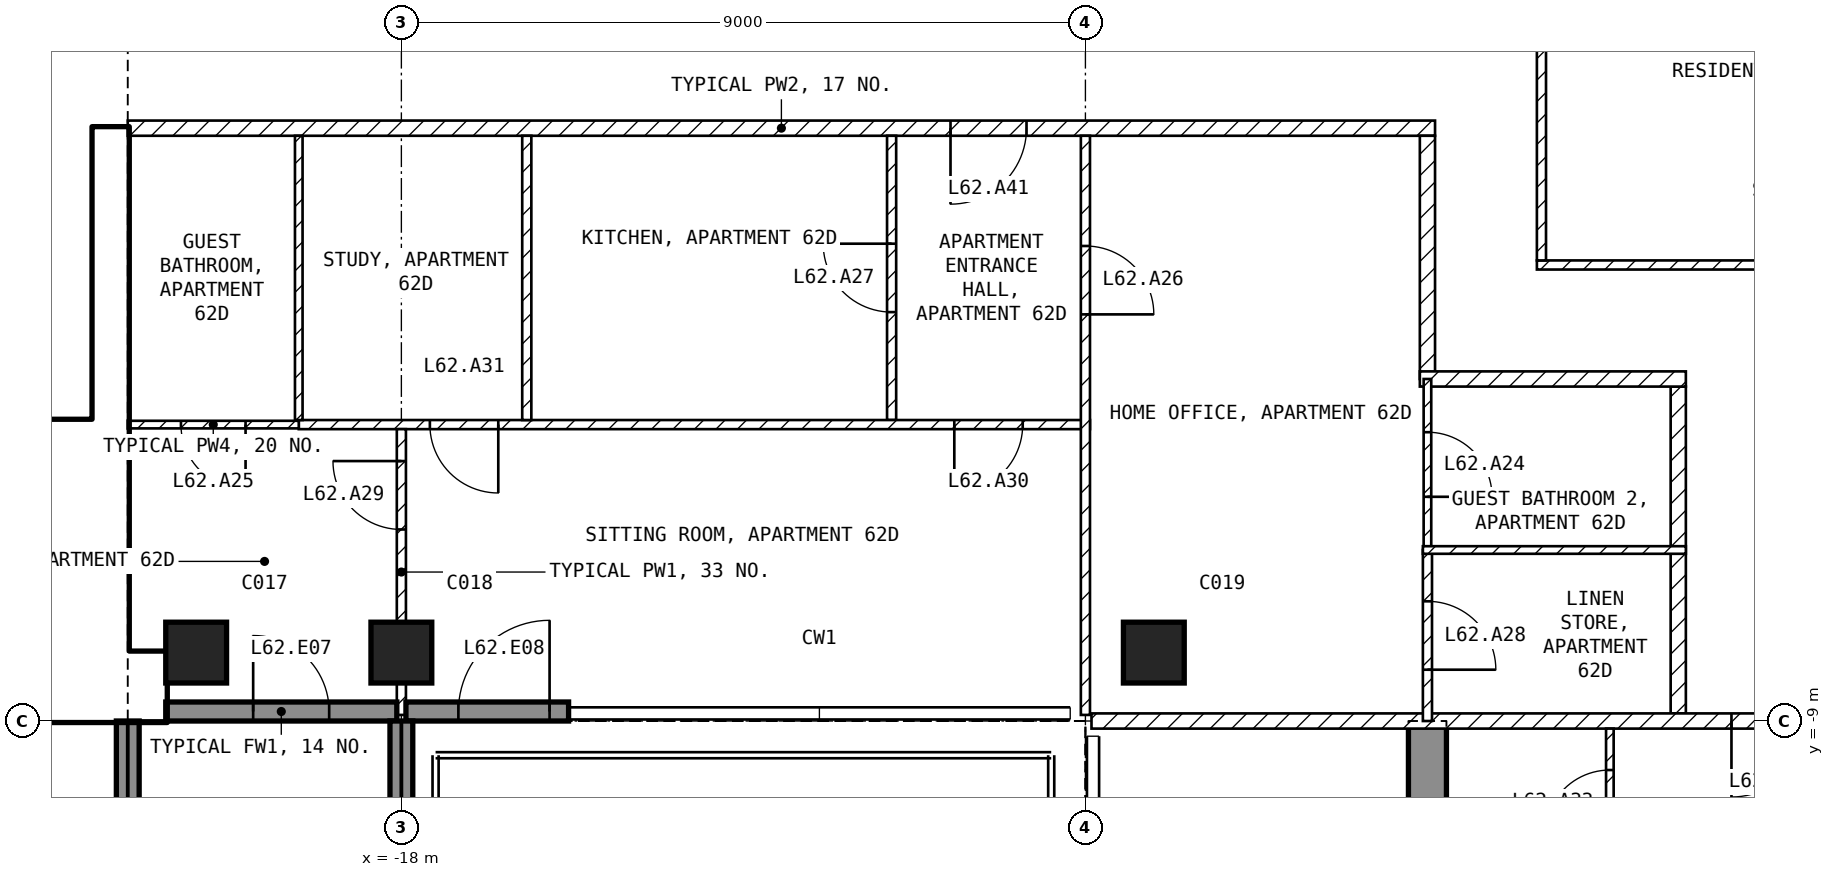
"""IFC4 building model, lengths in metres.
Left out: names, types, materials, properties, quantities, classifications, styles, units other than length and angle.
Written with IfcOpenShell. Run it as: python <this file> out.ifc"""

import sys

from ifc_helpers import new_model, si_unit, direction, frame, frame_2d, origin, origin_2d, place, context, subcontext, project, spatial, polyline, rectangle, outline, extrude, element, fill, save


model = new_model("IFC4")
c1 = context("Model", 3, precision=1e-05, world=origin(), true_north=direction((0.0, 1.0)))
c2 = subcontext(c1, "Body", "Model", "MODEL_VIEW")
j1 = project(units=[si_unit("LENGTHUNIT", "METRE"), si_unit("PLANEANGLEUNIT", "RADIAN")], contexts=[c1])
p1 = place(None, origin())
s1 = spatial("IfcSite", under=j1, at=p1, CompositionType="ELEMENT")
p2 = place(p1, origin())
s2 = spatial("IfcBuilding", under=s1, at=p2, CompositionType="ELEMENT")
p3 = place(p2, frame((0.0, 0.0, 246.5)))
s3 = spatial("IfcBuildingStorey", under=s2, at=p3, CompositionType="ELEMENT", Elevation=246.5)
for number, where, z_axis, x_axis in (
    (1, (-20.7, -8.1, -0.25), (0.0, 0.0, 1.0), (1.0, 0.0, 0.0)),
    (2, (-18.0, -8.1, -0.25), (0.0, 0.0, 1.0), (1.0, 0.0, 0.0)),
    (3, (-8.1, -8.1, -0.25), (0.0, 0.0, 1.0), (1.0, 0.0, 0.0)),
):
    element("IfcColumn", number, at=place(p3, frame(where, z_axis=z_axis, x_axis=x_axis)), inside=s3, PredefinedType="COLUMN", context=c2, shape_type="SweptSolid", body=[
        extrude(rectangle(XDim=0.8, YDim=0.8, at=origin_2d()), origin(), (0.0, 0.0, 1.0), 3.5),
    ])
p4 = place(p3, frame((-4.75, -16.7, -0.25), z_axis=(1.0, 0.0, 0.0), x_axis=(0.0, 1.0, 0.0)))
e4 = element("IfcWall", 4, at=p4, inside=s3, PredefinedType="SHEAR", context=c2, shape_type="SweptSolid", body=[
    extrude(outline(polyline([(0.0, 0.0), (3.2, 0.0), (3.2, 2.65), (5.6, 2.65), (5.6, 0.0), (7.7, 0.0), (7.7, 3.5), (0.0, 3.5), (0.0, 0.0)])), origin(), (0.0, 0.0, 1.0), 0.5),
])
p5 = place(p3, frame((-21.1, -8.875, 0.0), z_axis=(0.0, 0.0, 1.0), x_axis=(1.0, 0.0, 0.0)))
e5 = element("IfcWall", 5, at=p5, inside=s3, PredefinedType="SOLIDWALL", context=c2, shape_type="SweptSolid", body=[
    extrude(rectangle(XDim=3.04, YDim=0.25, at=frame_2d((1.52, 0.0))), origin(), (0.0, 0.0, 1.0), 3.25),
])
p6 = place(p5, frame((1.15, 0.0, 0.0)))
e6 = element("IfcOpeningElement", 6, at=p6, cuts=e5, PredefinedType="OPENING", context=c2, shape_type="SweptSolid", body=[
    extrude(rectangle(XDim=1.0, YDim=2.4, at=frame_2d((0.5, 1.2))), frame((0.0, 0.135, 0.0), z_axis=(0.0, -1.0, 0.0), x_axis=(1.0, 0.0, 0.0)), (0.0, 0.0, 1.0), 0.27),
])
p7 = place(p3, frame((-17.94, -8.875, 0.0), z_axis=(0.0, 0.0, 1.0), x_axis=(1.0, 0.0, 0.0)))
e7 = element("IfcWall", 7, at=p7, inside=s3, PredefinedType="SOLIDWALL", context=c2, shape_type="SweptSolid", body=[
    extrude(rectangle(XDim=2.14, YDim=0.25, at=frame_2d((1.07, 0.0))), origin(), (0.0, 0.0, 1.0), 3.25),
])
p8 = place(p7, frame((0.69, 0.0, 0.0)))
e8 = element("IfcOpeningElement", 8, at=p8, cuts=e7, PredefinedType="OPENING", context=c2, shape_type="SweptSolid", body=[
    extrude(rectangle(XDim=1.2, YDim=2.4, at=frame_2d((0.6, 1.2))), frame((0.0, 0.135, 0.0), z_axis=(0.0, -1.0, 0.0), x_axis=(1.0, 0.0, 0.0)), (0.0, 0.0, 1.0), 0.27),
])
p9 = place(p3, frame((-21.6, -9.0, 0.0), z_axis=(0.0, 0.0, 1.0), x_axis=(0.0, -1.0, 0.0)))
e9 = element("IfcWall", 9, at=p9, inside=s3, PredefinedType="SOLIDWALL", context=c2, shape_type="SweptSolid", body=[
    extrude(rectangle(XDim=2.7, YDim=0.3, at=frame_2d((1.35, 0.0))), origin(), (0.0, 0.0, 1.0), 3.25),
])
p10 = place(p3, frame((-18.0, -9.0, 0.0), z_axis=(0.0, 0.0, 1.0), x_axis=(0.0, -1.0, 0.0)))
e10 = element("IfcWall", 10, at=p10, inside=s3, PredefinedType="SOLIDWALL", context=c2, shape_type="SweptSolid", body=[
    extrude(rectangle(XDim=2.74, YDim=0.3, at=frame_2d((1.37, 0.0))), origin(), (0.0, 0.0, 1.0), 3.25),
])
p11 = place(p3, frame((-30.2, -8.55, 0.0), z_axis=(0.0, 0.0, 1.0), x_axis=(1.0, 0.0, 0.0)))
e11 = element("IfcWall", 11, at=p11, inside=s3, PredefinedType="SHEAR", context=c2, shape_type="SweptSolid", body=[
    extrude(rectangle(XDim=9.1, YDim=0.9, at=frame_2d((4.55, 0.0))), origin(), (0.0, 0.0, 1.0), 3.25),
])
p12 = place(p3, frame((-21.825, -8.1, 0.0), z_axis=(0.0, 0.0, 1.0), x_axis=(0.0, 1.0, 0.0)))
e12 = element("IfcWall", 12, at=p12, inside=s3, PredefinedType="SHEAR", context=c2, shape_type="SweptSolid", body=[
    extrude(rectangle(XDim=6.9, YDim=0.45, at=frame_2d((3.45, 0.0))), origin(), (0.0, 0.0, 1.0), 3.25),
])
p13 = place(p3, frame((-28.35, -5.15, 0.0), z_axis=(0.0, 0.0, 1.0), x_axis=(1.0, 0.0, 0.0)))
e13 = element("IfcWall", 13, at=p13, inside=s3, PredefinedType="SOLIDWALL", context=c2, shape_type="SweptSolid", body=[
    extrude(rectangle(XDim=6.3, YDim=0.2, at=frame_2d((3.15, 0.0))), origin(), (0.0, 0.0, 1.0), 3.25),
])
p14 = place(p13, frame((5.1, 0.0, 0.0)))
e14 = element("IfcOpeningElement", 14, at=p14, cuts=e13, PredefinedType="OPENING", context=c2, shape_type="SweptSolid", body=[
    extrude(rectangle(XDim=1.0, YDim=2.1, at=frame_2d((0.5, 1.05))), frame((0.0, 0.11, 0.0), z_axis=(0.0, -1.0, 0.0), x_axis=(1.0, 0.0, 0.0)), (0.0, 0.0, 1.0), 0.22),
])
p15 = place(p3, frame((-3.06, -3.0, 0.0), z_axis=(0.0, 0.0, 1.0), x_axis=(1.0, 0.0, 0.0)))
e15 = element("IfcWall", 15, at=p15, inside=s3, PredefinedType="PARTITIONING", context=c2, shape_type="SweptSolid", body=[
    extrude(rectangle(XDim=6.12, YDim=0.12, at=frame_2d((3.06, 0.0))), origin(), (0.0, 0.0, 1.0), 3.25),
])
p16 = place(p3, frame((-3.0, 2.94, 0.0), z_axis=(0.0, 0.0, 1.0), x_axis=(0.0, -1.0, 0.0)))
e16 = element("IfcWall", 16, at=p16, inside=s3, PredefinedType="PARTITIONING", context=c2, shape_type="SweptSolid", body=[
    extrude(rectangle(XDim=5.88, YDim=0.12, at=frame_2d((2.94, 0.0))), origin(), (0.0, 0.0, 1.0), 3.25),
])
p17 = place(p3, frame((-4.4, -1.2, 0.0), z_axis=(0.0, 0.0, 1.0), x_axis=(-1.0, 0.0, 0.0)))
e17 = element("IfcWall", 17, at=p17, inside=s3, PredefinedType="PARTITIONING", context=c2, shape_type="SweptSolid", body=[
    extrude(rectangle(XDim=17.2, YDim=0.2, at=frame_2d((8.6, 0.0))), origin(), (0.0, 0.0, 1.0), 3.25),
])
p18 = place(p17, frame((5.375, 0.0, 0.0)))
e18 = element("IfcOpeningElement", 18, at=p18, cuts=e17, PredefinedType="OPENING", context=c2, shape_type="SweptSolid", body=[
    extrude(rectangle(XDim=1.0, YDim=2.1, at=frame_2d((0.5, 1.05))), frame((0.0, 0.11, 0.0), z_axis=(0.0, -1.0, 0.0), x_axis=(1.0, 0.0, 0.0)), (0.0, 0.0, 1.0), 0.22),
])
p19 = place(p3, frame((-4.5, -4.5, 0.0), z_axis=(0.0, 0.0, 1.0), x_axis=(0.0, 1.0, 0.0)))
e19 = element("IfcWall", 19, at=p19, inside=s3, PredefinedType="PARTITIONING", context=c2, shape_type="SweptSolid", body=[
    extrude(rectangle(XDim=3.2, YDim=0.2, at=frame_2d((1.6, 0.0))), origin(), (0.0, 0.0, 1.0), 3.25),
])
p20 = place(p3, frame((-1.2, -8.9, 0.0), z_axis=(0.0, 0.0, 1.0), x_axis=(0.0, 1.0, 0.0)))
e20 = element("IfcWall", 20, at=p20, inside=s3, PredefinedType="PARTITIONING", context=c2, shape_type="SweptSolid", body=[
    extrude(rectangle(XDim=4.3, YDim=0.2, at=frame_2d((2.15, 0.0))), origin(), (0.0, 0.0, 1.0), 3.25),
])
p21 = place(p3, frame((-1.1, -4.5, 0.0), z_axis=(0.0, 0.0, 1.0), x_axis=(-1.0, 0.0, 0.0)))
e21 = element("IfcWall", 21, at=p21, inside=s3, PredefinedType="PARTITIONING", context=c2, shape_type="SweptSolid", body=[
    extrude(rectangle(XDim=3.5, YDim=0.2, at=frame_2d((1.75, 0.0))), origin(), (0.0, 0.0, 1.0), 3.25),
])
p22 = place(p3, frame((8.92, -9.0, 0.0), z_axis=(0.0, 0.0, 1.0), x_axis=(-1.0, 0.0, 0.0)))
e22 = element("IfcWall", 22, at=p22, inside=s3, PredefinedType="PARTITIONING", context=c2, shape_type="SweptSolid", body=[
    extrude(rectangle(XDim=17.84, YDim=0.2, at=frame_2d((8.92, 0.0))), origin(), (0.0, 0.0, 1.0), 3.25),
])
p23 = place(p22, frame((8.42, 0.0, 0.0)))
e23 = element("IfcOpeningElement", 23, at=p23, cuts=e22, PredefinedType="OPENING", context=c2, shape_type="SweptSolid", body=[
    extrude(rectangle(XDim=1.0, YDim=2.1, at=frame_2d((0.5, 1.05))), frame((0.0, 0.11, 0.0), z_axis=(0.0, -1.0, 0.0), x_axis=(1.0, 0.0, 0.0)), (0.0, 0.0, 1.0), 0.22),
])
p24 = place(p3, frame((-11.55, -5.04, 0.0), z_axis=(0.0, 0.0, 1.0), x_axis=(0.0, 1.0, 0.0)))
e24 = element("IfcWall", 24, at=p24, inside=s3, PredefinedType="PARTITIONING", context=c2, shape_type="SweptSolid", body=[
    extrude(rectangle(XDim=3.74, YDim=0.12, at=frame_2d((1.87, 0.0))), origin(), (0.0, 0.0, 1.0), 3.25),
])
p25 = place(p24, frame((1.42, 0.0, 0.0)))
e25 = element("IfcOpeningElement", 25, at=p25, cuts=e24, PredefinedType="OPENING", context=c2, shape_type="SweptSolid", body=[
    extrude(rectangle(XDim=0.9, YDim=2.1, at=frame_2d((0.45, 1.05))), frame((0.0, 0.07, 0.0), z_axis=(0.0, -1.0, 0.0), x_axis=(1.0, 0.0, 0.0)), (0.0, 0.0, 1.0), 0.14),
])
p26 = place(p3, frame((-8.94, -5.1, 0.0), z_axis=(0.0, 0.0, 1.0), x_axis=(-1.0, 0.0, 0.0)))
e26 = element("IfcWall", 26, at=p26, inside=s3, PredefinedType="PARTITIONING", context=c2, shape_type="SweptSolid", body=[
    extrude(rectangle(XDim=10.41, YDim=0.12, at=frame_2d((5.205, 0.0))), origin(), (0.0, 0.0, 1.0), 3.25),
])
p27 = place(p26, frame((0.885, 0.0, 0.0)))
e27 = element("IfcOpeningElement", 27, at=p27, cuts=e26, PredefinedType="OPENING", context=c2, shape_type="SweptSolid", body=[
    extrude(rectangle(XDim=0.9, YDim=2.1, at=frame_2d((0.45, 1.05))), frame((0.0, 0.07, 0.0), z_axis=(0.0, -1.0, 0.0), x_axis=(1.0, 0.0, 0.0)), (0.0, 0.0, 1.0), 0.14),
])
p28 = place(p26, frame((7.785, 0.0, 0.0)))
e28 = element("IfcOpeningElement", 28, at=p28, cuts=e26, PredefinedType="OPENING", context=c2, shape_type="SweptSolid", body=[
    extrude(rectangle(XDim=0.9, YDim=2.1, at=frame_2d((0.45, 1.05))), frame((0.0, 0.07, 0.0), z_axis=(0.0, -1.0, 0.0), x_axis=(1.0, 0.0, 0.0)), (0.0, 0.0, 1.0), 0.14),
])
p29 = place(p3, frame((-9.0, -1.3, 0.0), z_axis=(0.0, 0.0, 1.0), x_axis=(0.0, -1.0, 0.0)))
e29 = element("IfcWall", 29, at=p29, inside=s3, PredefinedType="PARTITIONING", context=c2, shape_type="SweptSolid", body=[
    extrude(rectangle(XDim=7.62, YDim=0.12, at=frame_2d((3.81, 0.0))), origin(), (0.0, 0.0, 1.0), 3.25),
])
p30 = place(p29, frame((1.45, 0.0, 0.0)))
e30 = element("IfcOpeningElement", 30, at=p30, cuts=e29, PredefinedType="OPENING", context=c2, shape_type="SweptSolid", body=[
    extrude(rectangle(XDim=0.9, YDim=2.1, at=frame_2d((0.45, 1.05))), frame((0.0, 0.07, 0.0), z_axis=(0.0, -1.0, 0.0), x_axis=(1.0, 0.0, 0.0)), (0.0, 0.0, 1.0), 0.14),
])
p31 = place(p3, frame((-16.35, -5.04, 0.0), z_axis=(0.0, 0.0, 1.0), x_axis=(0.0, 1.0, 0.0)))
e31 = element("IfcWall", 31, at=p31, inside=s3, PredefinedType="PARTITIONING", context=c2, shape_type="SweptSolid", body=[
    extrude(rectangle(XDim=3.74, YDim=0.12, at=frame_2d((1.87, 0.0))), origin(), (0.0, 0.0, 1.0), 3.25),
])
p32 = place(p3, frame((-19.35, -5.04, 0.0), z_axis=(0.0, 0.0, 1.0), x_axis=(0.0, 1.0, 0.0)))
e32 = element("IfcWall", 32, at=p32, inside=s3, PredefinedType="PARTITIONING", context=c2, shape_type="SweptSolid", body=[
    extrude(rectangle(XDim=3.74, YDim=0.1, at=frame_2d((1.87, 0.0))), origin(), (0.0, 0.0, 1.0), 3.25),
])
p33 = place(p3, frame((-19.35, -5.1, 0.0), z_axis=(0.0, 0.0, 1.0), x_axis=(-1.0, 0.0, 0.0)))
e33 = element("IfcWall", 33, at=p33, inside=s3, PredefinedType="PARTITIONING", context=c2, shape_type="SweptSolid", body=[
    extrude(rectangle(XDim=2.25, YDim=0.1, at=frame_2d((1.125, 0.0))), origin(), (0.0, 0.0, 1.0), 3.25),
])
p34 = place(p33, frame((0.7, 0.0, 0.0)))
e34 = element("IfcOpeningElement", 34, at=p34, cuts=e33, PredefinedType="OPENING", context=c2, shape_type="SweptSolid", body=[
    extrude(rectangle(XDim=0.85, YDim=2.1, at=frame_2d((0.425, 1.05))), frame((0.0, 0.06, 0.0), z_axis=(0.0, -1.0, 0.0), x_axis=(1.0, 0.0, 0.0)), (0.0, 0.0, 1.0), 0.12),
])
p35 = place(p3, frame((-18.0, -8.92, 0.0), z_axis=(0.0, 0.0, 1.0), x_axis=(0.0, 1.0, 0.0)))
e35 = element("IfcWall", 35, at=p35, inside=s3, PredefinedType="PARTITIONING", context=c2, shape_type="SweptSolid", body=[
    extrude(rectangle(XDim=3.76, YDim=0.12, at=frame_2d((1.88, 0.0))), origin(), (0.0, 0.0, 1.0), 2.496),
])
p36 = place(p35, frame((2.44, 0.0, 0.0)))
e36 = element("IfcOpeningElement", 36, at=p36, cuts=e35, PredefinedType="OPENING", context=c2, shape_type="SweptSolid", body=[
    extrude(rectangle(XDim=0.9, YDim=2.1, at=frame_2d((0.45, 1.05))), frame((0.0, 0.07, 0.0), z_axis=(0.0, -1.0, 0.0), x_axis=(1.0, 0.0, 0.0)), (0.0, 0.0, 1.0), 0.14),
])
p37 = place(p3, frame((-4.5, -4.5, 0.0), z_axis=(0.0, 0.0, 1.0), x_axis=(0.0, -1.0, 0.0)))
e37 = element("IfcWall", 37, at=p37, inside=s3, PredefinedType="PARTITIONING", context=c2, shape_type="SweptSolid", body=[
    extrude(rectangle(XDim=2.25, YDim=0.1, at=frame_2d((1.125, 0.0))), origin(), (0.0, 0.0, 1.0), 3.25),
])
p38 = place(p37, frame((0.7, 0.0, 0.0)))
e38 = element("IfcOpeningElement", 38, at=p38, cuts=e37, PredefinedType="OPENING", context=c2, shape_type="SweptSolid", body=[
    extrude(rectangle(XDim=0.85, YDim=2.1, at=frame_2d((0.425, 1.05))), frame((0.0, 0.06, 0.0), z_axis=(0.0, -1.0, 0.0), x_axis=(1.0, 0.0, 0.0)), (0.0, 0.0, 1.0), 0.12),
])
p39 = place(p3, frame((-4.5, -6.75, 0.0), z_axis=(0.0, 0.0, 1.0), x_axis=(0.0, -1.0, 0.0)))
e39 = element("IfcWall", 39, at=p39, inside=s3, PredefinedType="PARTITIONING", context=c2, shape_type="SweptSolid", body=[
    extrude(rectangle(XDim=2.25, YDim=0.12, at=frame_2d((1.125, 0.0))), origin(), (0.0, 0.0, 1.0), 3.25),
])
p40 = place(p39, frame((0.675, 0.0, 0.0)))
e40 = element("IfcOpeningElement", 40, at=p40, cuts=e39, PredefinedType="OPENING", context=c2, shape_type="SweptSolid", body=[
    extrude(rectangle(XDim=0.9, YDim=2.1, at=frame_2d((0.45, 1.05))), frame((0.0, 0.07, 0.0), z_axis=(0.0, -1.0, 0.0), x_axis=(1.0, 0.0, 0.0)), (0.0, 0.0, 1.0), 0.14),
])
p41 = place(p3, frame((-1.1, -6.75, 0.0), z_axis=(0.0, 0.0, 1.0), x_axis=(-1.0, 0.0, 0.0)))
e41 = element("IfcWall", 41, at=p41, inside=s3, PredefinedType="PARTITIONING", context=c2, shape_type="SweptSolid", body=[
    extrude(rectangle(XDim=3.46, YDim=0.1, at=frame_2d((1.73, 0.0))), origin(), (0.0, 0.0, 1.0), 3.25),
])
p42 = place(p3, frame((-2.1, -11.04, 0.0), z_axis=(0.0, 0.0, 1.0), x_axis=(0.0, 1.0, 0.0)))
e42 = element("IfcWall", 42, at=p42, inside=s3, PredefinedType="PARTITIONING", context=c2, shape_type="SweptSolid", body=[
    extrude(rectangle(XDim=1.94, YDim=0.1, at=frame_2d((0.97, 0.0))), origin(), (0.0, 0.0, 1.0), 3.25),
])
p43 = place(p42, frame((0.545, 0.0, 0.0)))
e43 = element("IfcOpeningElement", 43, at=p43, cuts=e42, PredefinedType="OPENING", context=c2, shape_type="SweptSolid", body=[
    extrude(rectangle(XDim=0.85, YDim=2.1, at=frame_2d((0.425, 1.05))), frame((0.0, 0.06, 0.0), z_axis=(0.0, -1.0, 0.0), x_axis=(1.0, 0.0, 0.0)), (0.0, 0.0, 1.0), 0.12),
])
p44 = place(p6, origin())
e44 = element("IfcDoor", 44, at=p44, inside=s3, OperationType="SINGLE_SWING_LEFT", PredefinedType="DOOR", context=c2, shape_type="SweptSolid", body=[
    extrude(rectangle(XDim=1.0, YDim=2.4, at=frame_2d((0.5, 1.2))), frame((0.0, 0.025, 0.0), z_axis=(0.0, -1.0, 0.0), x_axis=(1.0, 0.0, 0.0)), (0.0, 0.0, 1.0), 0.05),
])
fill(e6, e44)
p45 = place(p8, origin())
e45 = element("IfcDoor", 45, at=p45, inside=s3, OperationType="SINGLE_SWING_RIGHT", PredefinedType="DOOR", context=c2, shape_type="SweptSolid", body=[
    extrude(rectangle(XDim=1.2, YDim=2.4, at=frame_2d((0.6, 1.2))), frame((0.0, 0.025, 0.0), z_axis=(0.0, -1.0, 0.0), x_axis=(1.0, 0.0, 0.0)), (0.0, 0.0, 1.0), 0.05),
])
fill(e8, e45)
p46 = place(p14, origin())
e46 = element("IfcDoor", 46, at=p46, inside=s3, OperationType="SINGLE_SWING_LEFT", PredefinedType="DOOR", context=c2, shape_type="SweptSolid", body=[
    extrude(rectangle(XDim=1.0, YDim=2.1, at=frame_2d((0.5, 1.05))), frame((0.0, 0.025, 0.0), z_axis=(0.0, -1.0, 0.0), x_axis=(1.0, 0.0, 0.0)), (0.0, 0.0, 1.0), 0.05),
])
fill(e14, e46)
p47 = place(p38, origin())
e47 = element("IfcDoor", 47, at=p47, inside=s3, OperationType="SINGLE_SWING_RIGHT", PredefinedType="DOOR", context=c2, shape_type="SweptSolid", body=[
    extrude(rectangle(XDim=0.85, YDim=2.1, at=frame_2d((0.425, 1.05))), frame((0.0, 0.025, 0.0), z_axis=(0.0, -1.0, 0.0), x_axis=(1.0, 0.0, 0.0)), (0.0, 0.0, 1.0), 0.05),
])
fill(e38, e47)
p48 = place(p34, origin())
e48 = element("IfcDoor", 48, at=p48, inside=s3, OperationType="SINGLE_SWING_LEFT", PredefinedType="DOOR", context=c2, shape_type="SweptSolid", body=[
    extrude(rectangle(XDim=0.85, YDim=2.1, at=frame_2d((0.425, 1.05))), frame((0.0, 0.025, 0.0), z_axis=(0.0, -1.0, 0.0), x_axis=(1.0, 0.0, 0.0)), (0.0, 0.0, 1.0), 0.05),
])
fill(e34, e48)
p49 = place(p30, origin())
e49 = element("IfcDoor", 49, at=p49, inside=s3, OperationType="SINGLE_SWING_RIGHT", PredefinedType="DOOR", context=c2, shape_type="SweptSolid", body=[
    extrude(rectangle(XDim=0.9, YDim=2.1, at=frame_2d((0.45, 1.05))), frame((0.0, 0.025, 0.0), z_axis=(0.0, -1.0, 0.0), x_axis=(1.0, 0.0, 0.0)), (0.0, 0.0, 1.0), 0.05),
])
fill(e30, e49)
p50 = place(p25, origin())
e50 = element("IfcDoor", 50, at=p50, inside=s3, OperationType="SINGLE_SWING_RIGHT", PredefinedType="DOOR", context=c2, shape_type="SweptSolid", body=[
    extrude(rectangle(XDim=0.9, YDim=2.1, at=frame_2d((0.45, 1.05))), frame((0.0, 0.025, 0.0), z_axis=(0.0, -1.0, 0.0), x_axis=(1.0, 0.0, 0.0)), (0.0, 0.0, 1.0), 0.05),
])
fill(e25, e50)
p51 = place(p40, origin())
e51 = element("IfcDoor", 51, at=p51, inside=s3, OperationType="SINGLE_SWING_RIGHT", PredefinedType="DOOR", context=c2, shape_type="SweptSolid", body=[
    extrude(rectangle(XDim=0.9, YDim=2.1, at=frame_2d((0.45, 1.05))), frame((0.0, 0.025, 0.0), z_axis=(0.0, -1.0, 0.0), x_axis=(1.0, 0.0, 0.0)), (0.0, 0.0, 1.0), 0.05),
])
fill(e40, e51)
p52 = place(p36, origin())
e52 = element("IfcDoor", 52, at=p52, inside=s3, OperationType="SINGLE_SWING_RIGHT", PredefinedType="DOOR", context=c2, shape_type="SweptSolid", body=[
    extrude(rectangle(XDim=0.9, YDim=2.1, at=frame_2d((0.45, 1.05))), frame((0.0, 0.025, 0.0), z_axis=(0.0, -1.0, 0.0), x_axis=(1.0, 0.0, 0.0)), (0.0, 0.0, 1.0), 0.05),
])
fill(e36, e52)
p53 = place(p27, origin())
e53 = element("IfcDoor", 53, at=p53, inside=s3, OperationType="SINGLE_SWING_RIGHT", PredefinedType="DOOR", context=c2, shape_type="SweptSolid", body=[
    extrude(rectangle(XDim=0.9, YDim=2.1, at=frame_2d((0.45, 1.05))), frame((0.0, 0.025, 0.0), z_axis=(0.0, -1.0, 0.0), x_axis=(1.0, 0.0, 0.0)), (0.0, 0.0, 1.0), 0.05),
])
fill(e27, e53)
p54 = place(p28, origin())
e54 = element("IfcDoor", 54, at=p54, inside=s3, OperationType="SINGLE_SWING_LEFT", PredefinedType="DOOR", context=c2, shape_type="SweptSolid", body=[
    extrude(rectangle(XDim=0.9, YDim=2.1, at=frame_2d((0.45, 1.05))), frame((0.0, 0.025, 0.0), z_axis=(0.0, -1.0, 0.0), x_axis=(1.0, 0.0, 0.0)), (0.0, 0.0, 1.0), 0.05),
])
fill(e28, e54)
p55 = place(p23, origin())
e55 = element("IfcDoor", 55, at=p55, inside=s3, OperationType="SINGLE_SWING_RIGHT", PredefinedType="DOOR", context=c2, shape_type="SweptSolid", body=[
    extrude(rectangle(XDim=1.0, YDim=2.1, at=frame_2d((0.5, 1.05))), frame((0.0, 0.025, 0.0), z_axis=(0.0, -1.0, 0.0), x_axis=(1.0, 0.0, 0.0)), (0.0, 0.0, 1.0), 0.05),
])
fill(e23, e55)
p56 = place(p43, origin())
e56 = element("IfcDoor", 56, at=p56, inside=s3, OperationType="SINGLE_SWING_LEFT", PredefinedType="DOOR", context=c2, shape_type="SweptSolid", body=[
    extrude(rectangle(XDim=0.85, YDim=2.1, at=frame_2d((0.425, 1.05))), frame((0.0, 0.025, 0.0), z_axis=(0.0, -1.0, 0.0), x_axis=(1.0, 0.0, 0.0)), (0.0, 0.0, 1.0), 0.05),
])
fill(e43, e56)
p57 = place(p18, origin())
e57 = element("IfcDoor", 57, at=p57, inside=s3, OperationType="SINGLE_SWING_RIGHT", PredefinedType="DOOR", context=c2, shape_type="SweptSolid", body=[
    extrude(rectangle(XDim=1.0, YDim=2.1, at=frame_2d((0.5, 1.05))), frame((0.0, 0.025, 0.0), z_axis=(0.0, -1.0, 0.0), x_axis=(1.0, 0.0, 0.0)), (0.0, 0.0, 1.0), 0.05),
])
fill(e18, e57)
save(model, sys.argv[1])
